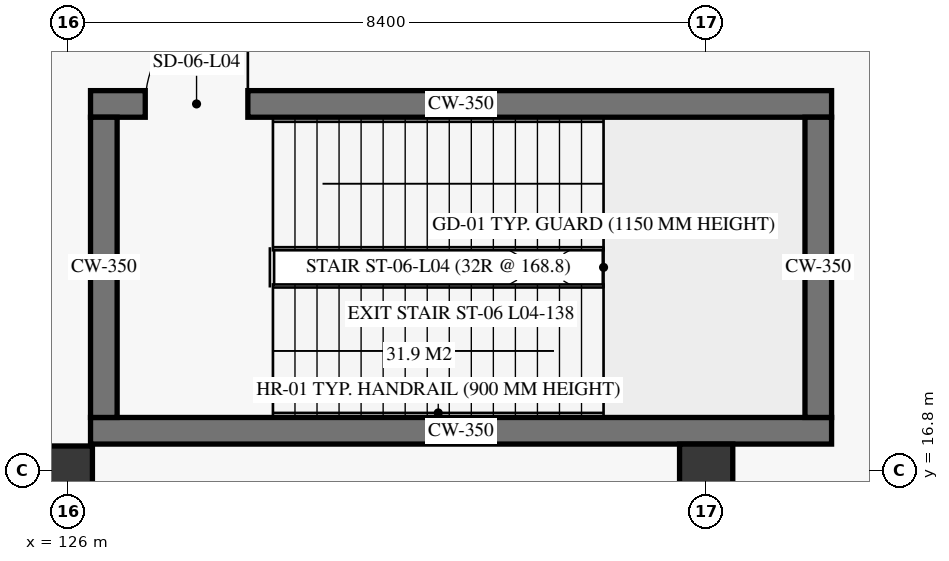
"""IFC4 building model, lengths in metres.
Left out: names, types, materials, properties, quantities, classifications, styles, units other than length and angle.
Written with IfcOpenShell. Run it as: python <this file> out.ifc"""

import sys

from ifc_helpers import new_model, si_unit, direction, frame, frame_2d, origin, origin_2d, place, context, subcontext, project, spatial, rectangle, extrude, element, fill, save


model = new_model("IFC4")
c1 = context("Model", 3, precision=1e-05, world=origin(), true_north=direction((0.0, 1.0)))
c2 = subcontext(c1, "Body", "Model", "MODEL_VIEW")
j1 = project(units=[si_unit("LENGTHUNIT", "METRE"), si_unit("PLANEANGLEUNIT", "RADIAN")], contexts=[c1])
p1 = place(None, origin())
s1 = spatial("IfcSite", under=j1, at=p1, CompositionType="ELEMENT")
p2 = place(p1, origin())
s2 = spatial("IfcBuilding", under=s1, at=p2, CompositionType="ELEMENT")
p3 = place(p2, frame((0.0, 0.0, 16.8)))
s3 = spatial("IfcBuildingStorey", under=s2, at=p3, CompositionType="ELEMENT", Elevation=16.8)
p4 = place(p3, frame((126.0, 16.8, 0.0), z_axis=(0.0, 0.0, 1.0), x_axis=(1.0, 0.0, 0.0)))
e1 = element("IfcColumn", 1, at=p4, inside=s3, PredefinedType="COLUMN", context=c2, shape_type="SweptSolid", body=[
    extrude(rectangle(XDim=0.65, YDim=0.65, at=origin_2d()), origin(), (0.0, 0.0, 1.0), 5.1),
])
p5 = place(p3, frame((134.4, 16.8, 0.0), z_axis=(0.0, 0.0, 1.0), x_axis=(1.0, 0.0, 0.0)))
e2 = element("IfcColumn", 2, at=p5, inside=s3, PredefinedType="COLUMN", context=c2, shape_type="SweptSolid", body=[
    extrude(rectangle(XDim=0.7, YDim=0.7, at=origin_2d()), origin(), (0.0, 0.0, 1.0), 5.1),
])
p6 = place(p3, frame((126.3, 17.325, 0.0), z_axis=(0.0, 0.0, 1.0), x_axis=(1.0, 0.0, 0.0)))
e3 = element("IfcWall", 3, at=p6, inside=s3, PredefinedType="SHEAR", context=c2, shape_type="SweptSolid", body=[
    extrude(rectangle(XDim=9.75, YDim=0.35, at=frame_2d((4.875, 0.0))), origin(), (0.0, 0.0, 1.0), 5.1),
])
p7 = place(p3, frame((126.3, 21.625, 0.0), z_axis=(0.0, 0.0, 1.0), x_axis=(1.0, 0.0, 0.0)))
e4 = element("IfcWall", 4, at=p7, inside=s3, PredefinedType="SHEAR", context=c2, shape_type="SweptSolid", body=[
    extrude(rectangle(XDim=9.75, YDim=0.35, at=frame_2d((4.875, 0.0))), origin(), (0.0, 0.0, 1.0), 5.1),
])
p8 = place(p7, frame((0.72, 0.0, 0.0)))
e5 = element("IfcOpeningElement", 5, at=p8, cuts=e4, PredefinedType="OPENING", context=c2, shape_type="SweptSolid", body=[
    extrude(rectangle(XDim=1.35, YDim=2.25, at=frame_2d((0.675, 1.125))), frame((0.0, 0.185, 0.0), z_axis=(0.0, -1.0, 0.0), x_axis=(1.0, 0.0, 0.0)), (0.0, 0.0, 1.0), 0.37),
])
for number, where, z_axis, x_axis in (
    (6, (126.475, 17.5, 0.0), (0.0, 0.0, 1.0), (0.0, 1.0, 0.0)),
    (7, (135.875, 17.5, 0.0), (0.0, 0.0, 1.0), (0.0, 1.0, 0.0)),
):
    element("IfcWall", number, at=place(p3, frame(where, z_axis=z_axis, x_axis=x_axis)), inside=s3, PredefinedType="SHEAR", context=c2, shape_type="SweptSolid", body=[
        extrude(rectangle(XDim=3.95, YDim=0.35, at=frame_2d((1.975, 0.0))), origin(), (0.0, 0.0, 1.0), 5.1),
    ])
p9 = place(p8, origin())
e8 = element("IfcDoor", 8, at=p9, inside=s3, OperationType="SINGLE_SWING_RIGHT", PredefinedType="DOOR", context=c2, shape_type="SweptSolid", body=[
    extrude(rectangle(XDim=1.35, YDim=2.25, at=frame_2d((0.675, 1.125))), frame((0.0, 0.025, 0.0), z_axis=(0.0, -1.0, 0.0), x_axis=(1.0, 0.0, 0.0)), (0.0, 0.0, 1.0), 0.05),
])
fill(e5, e8)
save(model, sys.argv[1])
